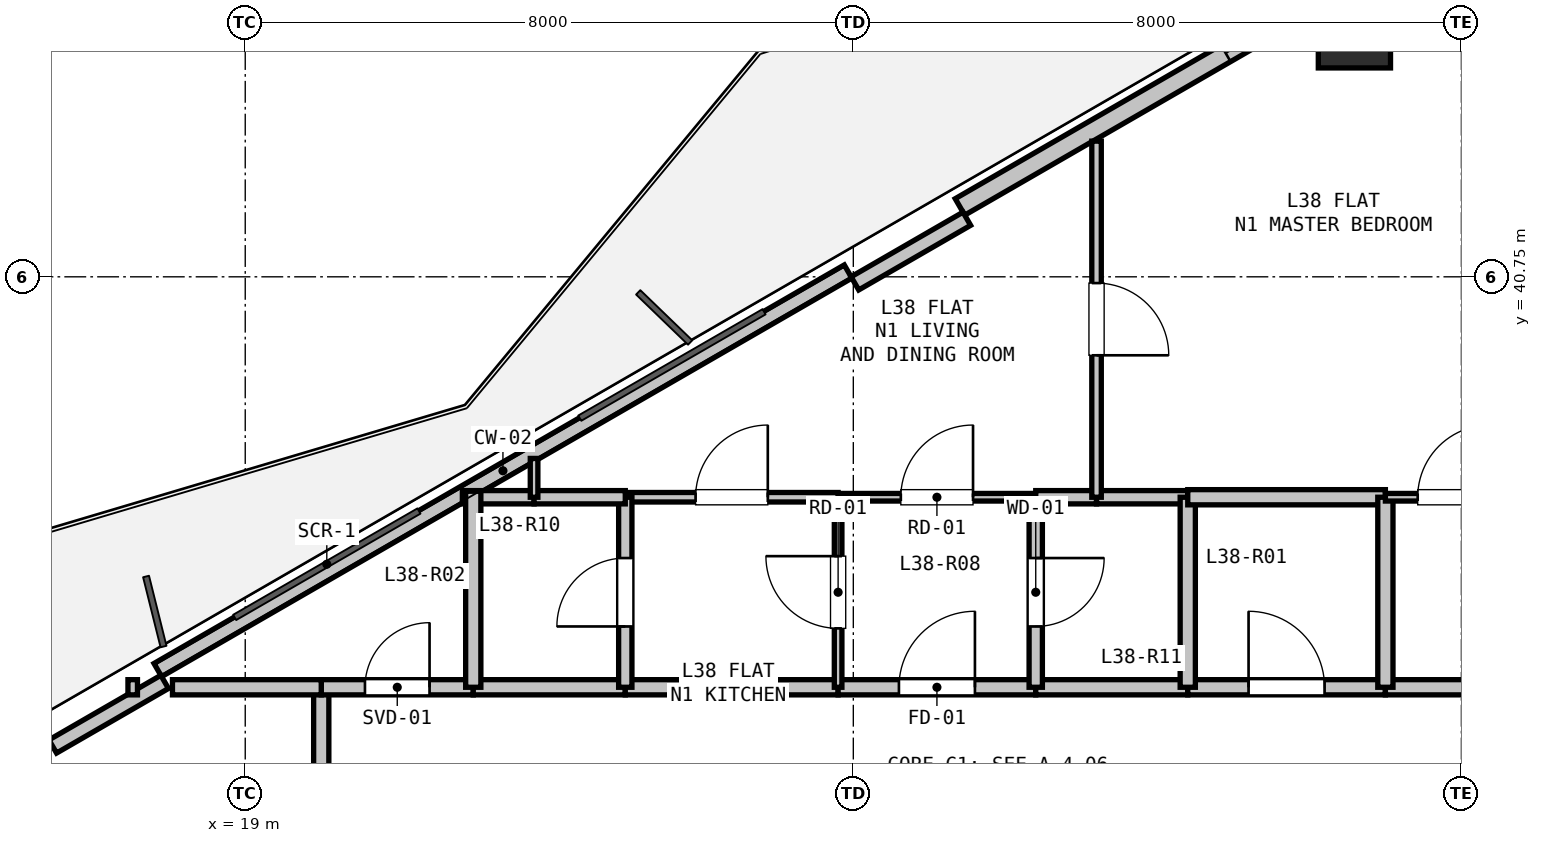
"""IFC4 building model, lengths in metres.
Left out: names, types, materials, properties, quantities, classifications, styles, units other than length and angle.
Written with IfcOpenShell. Run it as: python <this file> out.ifc"""

import sys

from ifc_helpers import new_model, si_unit, direction, frame, frame_2d, origin, origin_2d, place, context, subcontext, project, spatial, rectangle, hollow_rectangle, extrude, element, fill, save


model = new_model("IFC4")
c1 = context("Model", 3, precision=1e-05, world=origin(), true_north=direction((0.0, 1.0)))
c2 = subcontext(c1, "Body", "Model", "MODEL_VIEW")
j1 = project(units=[si_unit("LENGTHUNIT", "METRE"), si_unit("PLANEANGLEUNIT", "RADIAN")], contexts=[c1])
p1 = place(None, origin())
s1 = spatial("IfcSite", under=j1, at=p1, CompositionType="ELEMENT")
p2 = place(p1, origin())
s2 = spatial("IfcBuilding", under=s1, at=p2, CompositionType="ELEMENT")
p3 = place(p2, frame((0.0, 0.0, 137.7)))
s3 = spatial("IfcBuildingStorey", under=s2, at=p3, CompositionType="ELEMENT", Elevation=137.7)
p4 = place(p3, frame((33.593, 43.973, 0.0), z_axis=(0.0, 0.0, 1.0), x_axis=(1.0, 0.0, 0.0)))
e1 = element("IfcColumn", 1, at=p4, inside=s3, PredefinedType="COLUMN", context=c2, shape_type="SweptSolid", body=[
    extrude(hollow_rectangle(XDim=0.95, YDim=0.95, WallThickness=0.028, at=origin_2d()), origin(), (0.0, 0.0, 1.0), 3.3),
])
p5 = place(p3, frame((17.85, 35.577, 0.0), z_axis=(0.0, 0.0, 1.0), x_axis=(0.866026619769, 0.499997893847, 0.0)))
e2 = element("IfcWall", 2, at=p5, inside=s3, PredefinedType="PARAPET", context=c2, shape_type="SweptSolid", body=[
    extrude(rectangle(XDim=10.486, YDim=0.2, at=frame_2d((5.243, 0.0))), origin(), (0.0, 0.0, 1.0), 0.2),
])
p6 = place(p3, frame((28.403, 41.67, 0.0), z_axis=(0.0, 0.0, 1.0), x_axis=(0.86602239209, 0.500005216371, 0.0)))
e3 = element("IfcWall", 3, at=p6, inside=s3, PredefinedType="SOLIDWALL", context=c2, shape_type="SweptSolid", body=[
    extrude(rectangle(XDim=11.186, YDim=0.25, at=frame_2d((5.593, 0.0))), origin(), (0.0, 0.0, 1.0), 2.68),
])
p7 = place(p6, frame((4.039, 0.0, 0.9)))
e4 = element("IfcOpeningElement", 4, at=p7, cuts=e3, PredefinedType="OPENING", context=c2, shape_type="SweptSolid", body=[
    extrude(rectangle(XDim=1.2, YDim=1.4, at=frame_2d((0.6, 0.7))), frame((0.0, 0.135, 0.0), z_axis=(0.0, -1.0, 0.0), x_axis=(1.0, 0.0, 0.0)), (0.0, 0.0, 1.0), 0.27),
])
for number, where, z_axis, x_axis in (
    (5, (16.468, 34.571, 0.0), (0.0, 0.0, 1.0), (0.866, 0.5, 0.0)),
    (6, (27.021, 40.664, 0.0), (0.0, 0.0, 1.0), (0.866, 0.5, 0.0)),
):
    element("IfcWall", number, at=place(p3, frame(where, z_axis=z_axis, x_axis=x_axis)), inside=s3, PredefinedType="PARAPET", context=c2, shape_type="SweptSolid", body=[
        extrude(rectangle(XDim=1.7, YDim=0.2, at=frame_2d((0.85, 0.0))), origin(), (0.0, 0.0, 1.0), 2.68),
    ])
p8 = place(p3, frame((20.0, 32.75, 0.0), z_axis=(0.0, 0.0, 1.0), x_axis=(0.0, 1.0, 0.0)))
e7 = element("IfcWall", 7, at=p8, inside=s3, PredefinedType="PARTITIONING", context=c2, shape_type="SweptSolid", body=[
    extrude(rectangle(XDim=2.6, YDim=0.2, at=frame_2d((1.3, 0.0))), origin(), (0.0, 0.0, 1.0), 2.433),
])
p9 = place(p3, frame((20.0, 35.35, 0.0), z_axis=(0.0, 0.0, 1.0), x_axis=(1.0, 0.0, 0.0)))
e8 = element("IfcWall", 8, at=p9, inside=s3, PredefinedType="PARTITIONING", context=c2, shape_type="SweptSolid", body=[
    extrude(rectangle(XDim=2.0, YDim=0.2, at=frame_2d((1.0, 0.0))), origin(), (0.0, 0.0, 1.0), 3.06),
])
p10 = place(p9, frame((0.575, 0.0, 0.0)))
e9 = element("IfcOpeningElement", 9, at=p10, cuts=e8, PredefinedType="OPENING", context=c2, shape_type="SweptSolid", body=[
    extrude(rectangle(XDim=0.85, YDim=2.1, at=frame_2d((0.425, 1.05))), frame((0.0, 0.11, 0.0), z_axis=(0.0, -1.0, 0.0), x_axis=(1.0, 0.0, 0.0)), (0.0, 0.0, 1.0), 0.22),
])
p11 = place(p3, frame((22.0, 35.35, 0.0), z_axis=(0.0, 0.0, 1.0), x_axis=(1.0, 0.0, 0.0)))
e10 = element("IfcWall", 10, at=p11, inside=s3, PredefinedType="PARTITIONING", context=c2, shape_type="SweptSolid", body=[
    extrude(rectangle(XDim=2.0, YDim=0.2, at=frame_2d((1.0, 0.0))), origin(), (0.0, 0.0, 1.0), 3.06),
])
p12 = place(p3, frame((24.0, 35.35, 0.0), z_axis=(0.0, 0.0, 1.0), x_axis=(1.0, 0.0, 0.0)))
e11 = element("IfcWall", 11, at=p12, inside=s3, PredefinedType="PARTITIONING", context=c2, shape_type="SweptSolid", body=[
    extrude(rectangle(XDim=2.8, YDim=0.2, at=frame_2d((1.4, 0.0))), origin(), (0.0, 0.0, 1.0), 3.06),
])
p13 = place(p3, frame((26.8, 35.35, 0.0), z_axis=(0.0, 0.0, 1.0), x_axis=(1.0, 0.0, 0.0)))
e12 = element("IfcWall", 12, at=p13, inside=s3, PredefinedType="PARTITIONING", context=c2, shape_type="SweptSolid", body=[
    extrude(rectangle(XDim=2.6, YDim=0.2, at=frame_2d((1.3, 0.0))), origin(), (0.0, 0.0, 1.0), 3.06),
])
p14 = place(p13, frame((0.8, 0.0, 0.0)))
e13 = element("IfcOpeningElement", 13, at=p14, cuts=e12, PredefinedType="OPENING", context=c2, shape_type="SweptSolid", body=[
    extrude(rectangle(XDim=1.0, YDim=2.15, at=frame_2d((0.5, 1.075))), frame((0.0, 0.11, 0.0), z_axis=(0.0, -1.0, 0.0), x_axis=(1.0, 0.0, 0.0)), (0.0, 0.0, 1.0), 0.22),
])
p15 = place(p3, frame((29.4, 35.35, 0.0), z_axis=(0.0, 0.0, 1.0), x_axis=(1.0, 0.0, 0.0)))
e14 = element("IfcWall", 14, at=p15, inside=s3, PredefinedType="PARTITIONING", context=c2, shape_type="SweptSolid", body=[
    extrude(rectangle(XDim=2.0, YDim=0.2, at=frame_2d((1.0, 0.0))), origin(), (0.0, 0.0, 1.0), 3.06),
])
p16 = place(p3, frame((31.4, 35.35, 0.0), z_axis=(0.0, 0.0, 1.0), x_axis=(1.0, 0.0, 0.0)))
e15 = element("IfcWall", 15, at=p16, inside=s3, PredefinedType="PARTITIONING", context=c2, shape_type="SweptSolid", body=[
    extrude(rectangle(XDim=2.6, YDim=0.2, at=frame_2d((1.3, 0.0))), origin(), (0.0, 0.0, 1.0), 3.06),
])
p17 = place(p16, frame((0.8, 0.0, 0.0)))
e16 = element("IfcOpeningElement", 16, at=p17, cuts=e15, PredefinedType="OPENING", context=c2, shape_type="SweptSolid", body=[
    extrude(rectangle(XDim=1.0, YDim=2.15, at=frame_2d((0.5, 1.075))), frame((0.0, 0.11, 0.0), z_axis=(0.0, -1.0, 0.0), x_axis=(1.0, 0.0, 0.0)), (0.0, 0.0, 1.0), 0.22),
])
p18 = place(p3, frame((34.0, 35.35, 0.0), z_axis=(0.0, 0.0, 1.0), x_axis=(1.0, 0.0, 0.0)))
e17 = element("IfcWall", 17, at=p18, inside=s3, PredefinedType="PARTITIONING", context=c2, shape_type="SweptSolid", body=[
    extrude(rectangle(XDim=5.2, YDim=0.2, at=frame_2d((2.6, 0.0))), origin(), (0.0, 0.0, 1.0), 2.433),
])
p19 = place(p3, frame((26.8, 37.85, 0.0), z_axis=(0.0, 0.0, 1.0), x_axis=(1.0, 0.0, 0.0)))
e18 = element("IfcWall", 18, at=p19, inside=s3, PredefinedType="PARTITIONING", context=c2, shape_type="SweptSolid", body=[
    extrude(rectangle(XDim=2.6, YDim=0.1, at=frame_2d((1.3, 0.0))), origin(), (0.0, 0.0, 1.0), 3.06),
])
p20 = place(p19, frame((0.825, 0.0, 0.0)))
e19 = element("IfcOpeningElement", 19, at=p20, cuts=e18, PredefinedType="OPENING", context=c2, shape_type="SweptSolid", body=[
    extrude(rectangle(XDim=0.95, YDim=2.1, at=frame_2d((0.475, 1.05))), frame((0.0, 0.06, 0.0), z_axis=(0.0, -1.0, 0.0), x_axis=(1.0, 0.0, 0.0)), (0.0, 0.0, 1.0), 0.12),
])
p21 = place(p3, frame((29.4, 37.85, 0.0), z_axis=(0.0, 0.0, 1.0), x_axis=(0.0, -1.0, 0.0)))
e20 = element("IfcWall", 20, at=p21, inside=s3, PredefinedType="PLUMBINGWALL", context=c2, shape_type="SweptSolid", body=[
    extrude(rectangle(XDim=2.5, YDim=0.175, at=frame_2d((1.25, 0.0))), origin(), (0.0, 0.0, 1.0), 3.06),
])
p22 = place(p21, frame((0.8, 0.0, 0.0)))
e21 = element("IfcOpeningElement", 21, at=p22, cuts=e20, PredefinedType="OPENING", context=c2, shape_type="SweptSolid", body=[
    extrude(rectangle(XDim=0.9, YDim=2.1, at=frame_2d((0.45, 1.05))), frame((0.0, 0.097, 0.0), z_axis=(0.0, -1.0, 0.0), x_axis=(1.0, 0.0, 0.0)), (0.0, 0.0, 1.0), 0.195),
])
p23 = place(p3, frame((26.8, 35.35, 0.0), z_axis=(0.0, 0.0, 1.0), x_axis=(0.0, 1.0, 0.0)))
e22 = element("IfcWall", 22, at=p23, inside=s3, PredefinedType="PARTITIONING", context=c2, shape_type="SweptSolid", body=[
    extrude(rectangle(XDim=2.5, YDim=0.1, at=frame_2d((1.25, 0.0))), origin(), (0.0, 0.0, 1.0), 3.06),
])
p24 = place(p23, frame((0.775, 0.0, 0.0)))
e23 = element("IfcOpeningElement", 23, at=p24, cuts=e22, PredefinedType="OPENING", context=c2, shape_type="SweptSolid", body=[
    extrude(rectangle(XDim=0.95, YDim=2.1, at=frame_2d((0.475, 1.05))), frame((0.0, 0.06, 0.0), z_axis=(0.0, -1.0, 0.0), x_axis=(1.0, 0.0, 0.0)), (0.0, 0.0, 1.0), 0.12),
])
p25 = place(p3, frame((24.0, 37.85, 0.0), z_axis=(0.0, 0.0, 1.0), x_axis=(1.0, 0.0, 0.0)))
e24 = element("IfcWall", 24, at=p25, inside=s3, PredefinedType="PARTITIONING", context=c2, shape_type="SweptSolid", body=[
    extrude(rectangle(XDim=2.8, YDim=0.125, at=frame_2d((1.4, 0.0))), origin(), (0.0, 0.0, 1.0), 3.06),
])
p26 = place(p25, frame((0.925, 0.0, 0.0)))
e25 = element("IfcOpeningElement", 25, at=p26, cuts=e24, PredefinedType="OPENING", context=c2, shape_type="SweptSolid", body=[
    extrude(rectangle(XDim=0.95, YDim=2.1, at=frame_2d((0.475, 1.05))), frame((0.0, 0.073, 0.0), z_axis=(0.0, -1.0, 0.0), x_axis=(1.0, 0.0, 0.0)), (0.0, 0.0, 1.0), 0.145),
])
p27 = place(p3, frame((24.0, 35.35, 0.0), z_axis=(0.0, 0.0, 1.0), x_axis=(0.0, 1.0, 0.0)))
e26 = element("IfcWall", 26, at=p27, inside=s3, PredefinedType="PLUMBINGWALL", context=c2, shape_type="SweptSolid", body=[
    extrude(rectangle(XDim=2.5, YDim=0.175, at=frame_2d((1.25, 0.0))), origin(), (0.0, 0.0, 1.0), 3.06),
])
p28 = place(p27, frame((0.8, 0.0, 0.0)))
e27 = element("IfcOpeningElement", 27, at=p28, cuts=e26, PredefinedType="OPENING", context=c2, shape_type="SweptSolid", body=[
    extrude(rectangle(XDim=0.9, YDim=2.1, at=frame_2d((0.45, 1.05))), frame((0.0, 0.097, 0.0), z_axis=(0.0, -1.0, 0.0), x_axis=(1.0, 0.0, 0.0)), (0.0, 0.0, 1.0), 0.195),
])
p29 = place(p3, frame((21.856, 37.85, 0.0), z_axis=(0.0, 0.0, 1.0), x_axis=(1.0, 0.0, 0.0)))
e28 = element("IfcWall", 28, at=p29, inside=s3, PredefinedType="PLUMBINGWALL", context=c2, shape_type="SweptSolid", body=[
    extrude(rectangle(XDim=0.944, YDim=0.175, at=frame_2d((0.472, 0.0))), origin(), (0.0, 0.0, 1.0), 2.365),
])
p30 = place(p3, frame((22.8, 37.85, 0.0), z_axis=(0.0, 0.0, 1.0), x_axis=(1.0, 0.0, 0.0)))
e29 = element("IfcWall", 29, at=p30, inside=s3, PredefinedType="PLUMBINGWALL", context=c2, shape_type="SweptSolid", body=[
    extrude(rectangle(XDim=1.2, YDim=0.175, at=frame_2d((0.6, 0.0))), origin(), (0.0, 0.0, 1.0), 2.365),
])
p31 = place(p3, frame((22.0, 35.35, 0.0), z_axis=(0.0, 0.0, 1.0), x_axis=(0.0, 1.0, 0.0)))
e30 = element("IfcWall", 30, at=p31, inside=s3, PredefinedType="PARTITIONING", context=c2, shape_type="SweptSolid", body=[
    extrude(rectangle(XDim=2.579, YDim=0.2, at=frame_2d((1.29, 0.0))), origin(), (0.0, 0.0, 1.0), 2.365),
])
p32 = place(p3, frame((29.4, 37.85, 0.0), z_axis=(0.0, 0.0, 1.0), x_axis=(1.0, 0.0, 0.0)))
e31 = element("IfcWall", 31, at=p32, inside=s3, PredefinedType="PLUMBINGWALL", context=c2, shape_type="SweptSolid", body=[
    extrude(rectangle(XDim=0.8, YDim=0.175, at=frame_2d((0.4, 0.0))), origin(), (0.0, 0.0, 1.0), 3.06),
])
p33 = place(p3, frame((30.2, 37.85, 0.0), z_axis=(0.0, 0.0, 1.0), x_axis=(1.0, 0.0, 0.0)))
e32 = element("IfcWall", 32, at=p33, inside=s3, PredefinedType="PLUMBINGWALL", context=c2, shape_type="SweptSolid", body=[
    extrude(rectangle(XDim=1.2, YDim=0.175, at=frame_2d((0.6, 0.0))), origin(), (0.0, 0.0, 1.0), 3.06),
])
p34 = place(p3, frame((31.4, 37.85, 0.0), z_axis=(0.0, 0.0, 1.0), x_axis=(0.0, -1.0, 0.0)))
e33 = element("IfcWall", 33, at=p34, inside=s3, PredefinedType="PARTITIONING", context=c2, shape_type="SweptSolid", body=[
    extrude(rectangle(XDim=2.5, YDim=0.2, at=frame_2d((1.25, 0.0))), origin(), (0.0, 0.0, 1.0), 3.06),
])
p35 = place(p3, frame((31.4, 37.85, 0.0), z_axis=(0.0, 0.0, 1.0), x_axis=(1.0, 0.0, 0.0)))
e34 = element("IfcWall", 34, at=p35, inside=s3, PredefinedType="PARTITIONING", context=c2, shape_type="SweptSolid", body=[
    extrude(rectangle(XDim=2.6, YDim=0.2, at=frame_2d((1.3, 0.0))), origin(), (0.0, 0.0, 1.0), 3.06),
])
p36 = place(p3, frame((34.0, 37.85, 0.0), z_axis=(0.0, 0.0, 1.0), x_axis=(0.0, -1.0, 0.0)))
e35 = element("IfcWall", 35, at=p36, inside=s3, PredefinedType="PARTITIONING", context=c2, shape_type="SweptSolid", body=[
    extrude(rectangle(XDim=2.5, YDim=0.2, at=frame_2d((1.25, 0.0))), origin(), (0.0, 0.0, 1.0), 3.06),
])
p37 = place(p3, frame((20.0, 35.35, 0.0), z_axis=(0.0, 0.0, 1.0), x_axis=(-1.0, 0.0, 0.0)))
e36 = element("IfcWall", 36, at=p37, inside=s3, PredefinedType="PARTITIONING", context=c2, shape_type="SweptSolid", body=[
    extrude(rectangle(XDim=1.958, YDim=0.2, at=frame_2d((0.979, 0.0))), origin(), (0.0, 0.0, 1.0), 2.365),
])
p38 = place(p3, frame((17.582, 35.35, 0.0), z_axis=(0.0, 0.0, 1.0), x_axis=(-1.0, 0.0, 0.0)))
e37 = element("IfcWall", 37, at=p38, inside=s3, PredefinedType="PARTITIONING", context=c2, shape_type="SweptSolid", body=[
    extrude(rectangle(XDim=0.125, YDim=0.2, at=frame_2d((0.062, 0.0))), origin(), (0.0, 0.0, 1.0), 3.06),
])
p39 = place(p3, frame((34.0, 37.85, 0.0), z_axis=(0.0, 0.0, 1.0), x_axis=(1.0, 0.0, 0.0)))
e38 = element("IfcWall", 38, at=p39, inside=s3, PredefinedType="PARTITIONING", context=c2, shape_type="SweptSolid", body=[
    extrude(rectangle(XDim=1.8, YDim=0.1, at=frame_2d((0.9, 0.0))), origin(), (0.0, 0.0, 1.0), 3.06),
])
p40 = place(p39, frame((0.425, 0.0, 0.0)))
e39 = element("IfcOpeningElement", 39, at=p40, cuts=e38, PredefinedType="OPENING", context=c2, shape_type="SweptSolid", body=[
    extrude(rectangle(XDim=0.95, YDim=2.1, at=frame_2d((0.475, 1.05))), frame((0.0, 0.06, 0.0), z_axis=(0.0, -1.0, 0.0), x_axis=(1.0, 0.0, 0.0)), (0.0, 0.0, 1.0), 0.12),
])
p41 = place(p3, frame((22.8, 37.85, 0.0), z_axis=(0.0, 0.0, 1.0), x_axis=(0.0, 1.0, 0.0)))
e40 = element("IfcWall", 40, at=p41, inside=s3, PredefinedType="PARTITIONING", context=c2, shape_type="SweptSolid", body=[
    extrude(rectangle(XDim=0.51, YDim=0.1, at=frame_2d((0.255, 0.0))), origin(), (0.0, 0.0, 1.0), 2.725),
])
p42 = place(p3, frame((30.2, 42.535, 0.0), z_axis=(0.0, 0.0, 1.0), x_axis=(0.0, -1.0, 0.0)))
e41 = element("IfcWall", 41, at=p42, inside=s3, PredefinedType="PARTITIONING", context=c2, shape_type="SweptSolid", body=[
    extrude(rectangle(XDim=4.685, YDim=0.125, at=frame_2d((2.342, 0.0))), origin(), (0.0, 0.0, 1.0), 2.365),
])
p43 = place(p42, frame((1.867, 0.0, 0.0)))
e42 = element("IfcOpeningElement", 42, at=p43, cuts=e41, PredefinedType="OPENING", context=c2, shape_type="SweptSolid", body=[
    extrude(rectangle(XDim=0.95, YDim=2.1, at=frame_2d((0.475, 1.05))), frame((0.0, 0.073, 0.0), z_axis=(0.0, -1.0, 0.0), x_axis=(1.0, 0.0, 0.0)), (0.0, 0.0, 1.0), 0.145),
])
p44 = place(p7, origin())
e43 = element("IfcWindow", 43, at=p44, inside=s3, PartitioningType="SINGLE_PANEL", PredefinedType="WINDOW", context=c2, shape_type="SweptSolid", body=[
    extrude(rectangle(XDim=1.2, YDim=1.4, at=frame_2d((0.6, 0.7))), frame((0.0, 0.03, 0.0), z_axis=(0.0, -1.0, 0.0), x_axis=(1.0, 0.0, 0.0)), (0.0, 0.0, 1.0), 0.06),
])
fill(e4, e43)
p45 = place(p14, origin())
e44 = element("IfcDoor", 44, at=p45, inside=s3, OperationType="SINGLE_SWING_RIGHT", PredefinedType="DOOR", context=c2, shape_type="SweptSolid", body=[
    extrude(rectangle(XDim=1.0, YDim=2.15, at=frame_2d((0.5, 1.075))), frame((0.0, 0.025, 0.0), z_axis=(0.0, -1.0, 0.0), x_axis=(1.0, 0.0, 0.0)), (0.0, 0.0, 1.0), 0.05),
])
fill(e13, e44)
p46 = place(p17, origin())
e45 = element("IfcDoor", 45, at=p46, inside=s3, OperationType="SINGLE_SWING_LEFT", PredefinedType="DOOR", context=c2, shape_type="SweptSolid", body=[
    extrude(rectangle(XDim=1.0, YDim=2.15, at=frame_2d((0.5, 1.075))), frame((0.0, 0.025, 0.0), z_axis=(0.0, -1.0, 0.0), x_axis=(1.0, 0.0, 0.0)), (0.0, 0.0, 1.0), 0.05),
])
fill(e16, e45)
p47 = place(p10, origin())
e46 = element("IfcDoor", 46, at=p47, inside=s3, OperationType="SINGLE_SWING_RIGHT", PredefinedType="DOOR", context=c2, shape_type="SweptSolid", body=[
    extrude(rectangle(XDim=0.85, YDim=2.1, at=frame_2d((0.425, 1.05))), frame((0.0, 0.025, 0.0), z_axis=(0.0, -1.0, 0.0), x_axis=(1.0, 0.0, 0.0)), (0.0, 0.0, 1.0), 0.05),
])
fill(e9, e46)
p48 = place(p24, origin())
e47 = element("IfcDoor", 47, at=p48, inside=s3, OperationType="SINGLE_SWING_RIGHT", PredefinedType="DOOR", context=c2, shape_type="SweptSolid", body=[
    extrude(rectangle(XDim=0.95, YDim=2.1, at=frame_2d((0.475, 1.05))), frame((0.0, 0.025, 0.0), z_axis=(0.0, -1.0, 0.0), x_axis=(1.0, 0.0, 0.0)), (0.0, 0.0, 1.0), 0.05),
])
fill(e23, e47)
p49 = place(p22, origin())
e48 = element("IfcDoor", 48, at=p49, inside=s3, OperationType="SINGLE_SWING_LEFT", PredefinedType="DOOR", context=c2, shape_type="SweptSolid", body=[
    extrude(rectangle(XDim=0.9, YDim=2.1, at=frame_2d((0.45, 1.05))), frame((0.0, 0.025, 0.0), z_axis=(0.0, -1.0, 0.0), x_axis=(1.0, 0.0, 0.0)), (0.0, 0.0, 1.0), 0.05),
])
fill(e21, e48)
p50 = place(p20, origin())
e49 = element("IfcDoor", 49, at=p50, inside=s3, OperationType="SINGLE_SWING_RIGHT", PredefinedType="DOOR", context=c2, shape_type="SweptSolid", body=[
    extrude(rectangle(XDim=0.95, YDim=2.1, at=frame_2d((0.475, 1.05))), frame((0.0, 0.025, 0.0), z_axis=(0.0, -1.0, 0.0), x_axis=(1.0, 0.0, 0.0)), (0.0, 0.0, 1.0), 0.05),
])
fill(e19, e49)
p51 = place(p26, origin())
e50 = element("IfcDoor", 50, at=p51, inside=s3, OperationType="SINGLE_SWING_RIGHT", PredefinedType="DOOR", context=c2, shape_type="SweptSolid", body=[
    extrude(rectangle(XDim=0.95, YDim=2.1, at=frame_2d((0.475, 1.05))), frame((0.0, 0.025, 0.0), z_axis=(0.0, -1.0, 0.0), x_axis=(1.0, 0.0, 0.0)), (0.0, 0.0, 1.0), 0.05),
])
fill(e25, e50)
p52 = place(p40, origin())
e51 = element("IfcDoor", 51, at=p52, inside=s3, OperationType="SINGLE_SWING_RIGHT", PredefinedType="DOOR", context=c2, shape_type="SweptSolid", body=[
    extrude(rectangle(XDim=0.95, YDim=2.1, at=frame_2d((0.475, 1.05))), frame((0.0, 0.025, 0.0), z_axis=(0.0, -1.0, 0.0), x_axis=(1.0, 0.0, 0.0)), (0.0, 0.0, 1.0), 0.05),
])
fill(e39, e51)
p53 = place(p43, origin())
e52 = element("IfcDoor", 52, at=p53, inside=s3, OperationType="SINGLE_SWING_RIGHT", PredefinedType="DOOR", context=c2, shape_type="SweptSolid", body=[
    extrude(rectangle(XDim=0.95, YDim=2.1, at=frame_2d((0.475, 1.05))), frame((0.0, 0.025, 0.0), z_axis=(0.0, -1.0, 0.0), x_axis=(1.0, 0.0, 0.0)), (0.0, 0.0, 1.0), 0.05),
])
fill(e42, e52)
p54 = place(p28, origin())
e53 = element("IfcDoor", 53, at=p54, inside=s3, OperationType="SINGLE_SWING_LEFT", PredefinedType="DOOR", context=c2, shape_type="SweptSolid", body=[
    extrude(rectangle(XDim=0.9, YDim=2.1, at=frame_2d((0.45, 1.05))), frame((0.0, 0.025, 0.0), z_axis=(0.0, -1.0, 0.0), x_axis=(1.0, 0.0, 0.0)), (0.0, 0.0, 1.0), 0.05),
])
fill(e27, e53)
save(model, sys.argv[1])
